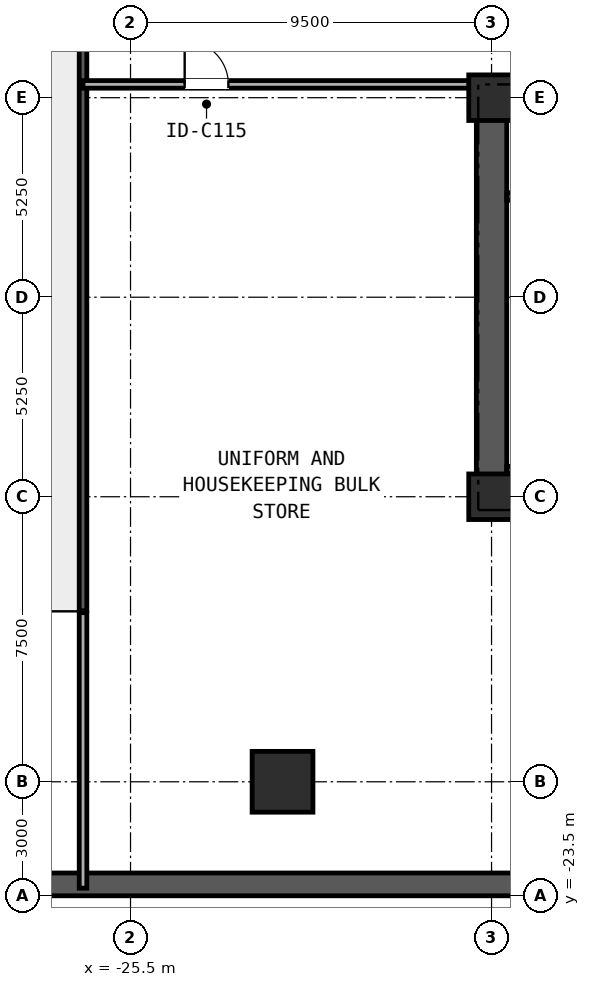
"""IFC4 building model, lengths in metres.
Left out: names, types, materials, properties, quantities, classifications, styles, units other than length and angle.
Written with IfcOpenShell. Run it as: python <this file> out.ifc"""

import sys

from ifc_helpers import new_model, si_unit, direction, frame, frame_2d, origin, origin_2d, place, context, subcontext, project, spatial, rectangle, extrude, element, fill, save


model = new_model("IFC4")
c1 = context("Model", 3, precision=1e-05, world=origin(), true_north=direction((0.0, 1.0)))
c2 = subcontext(c1, "Body", "Model", "MODEL_VIEW")
j1 = project(units=[si_unit("LENGTHUNIT", "METRE"), si_unit("PLANEANGLEUNIT", "RADIAN")], contexts=[c1])
p1 = place(None, origin())
s1 = spatial("IfcSite", under=j1, at=p1, CompositionType="ELEMENT")
p2 = place(p1, origin())
s2 = spatial("IfcBuilding", under=s1, at=p2, CompositionType="ELEMENT")
p3 = place(p2, frame((0.0, 0.0, -5.2)))
s3 = spatial("IfcBuildingStorey", under=s2, at=p3, CompositionType="ELEMENT", Elevation=-5.2)
p4 = place(p3, frame((-16.4, -13.0, 0.0), z_axis=(0.0, 0.0, 1.0), x_axis=(1.0, 0.0, 0.0)))
e1 = element("IfcWall", 1, at=p4, inside=s3, PredefinedType="SHEAR", context=c2, shape_type="SweptSolid", body=[
    extrude(rectangle(XDim=32.8, YDim=0.8, at=frame_2d((16.4, 0.0))), origin(), (0.0, 0.0, 1.0), 4.62),
])
p5 = place(p3, frame((-16.4, -2.5, 0.0), z_axis=(0.0, 0.0, 1.0), x_axis=(1.0, 0.0, 0.0)))
e2 = element("IfcWall", 2, at=p5, inside=s3, PredefinedType="SHEAR", context=c2, shape_type="SweptSolid", body=[
    extrude(rectangle(XDim=32.8, YDim=0.8, at=frame_2d((16.4, 0.0))), origin(), (0.0, 0.0, 1.0), 4.62),
])
p6 = place(p5, frame((6.025, 0.0, 0.0)))
e3 = element("IfcOpeningElement", 3, at=p6, cuts=e2, PredefinedType="OPENING", context=c2, shape_type="SweptSolid", body=[
    extrude(rectangle(XDim=1.15, YDim=2.0, at=frame_2d((0.575, 1.0))), frame((0.0, 0.41, 0.0), z_axis=(0.0, -1.0, 0.0), x_axis=(1.0, 0.0, 0.0)), (0.0, 0.0, 1.0), 0.82),
])
p7 = place(p5, frame((15.6, 0.0, 0.0)))
e4 = element("IfcOpeningElement", 4, at=p7, cuts=e2, PredefinedType="OPENING", context=c2, shape_type="SweptSolid", body=[
    extrude(rectangle(XDim=1.6, YDim=2.0, at=frame_2d((0.8, 1.0))), frame((0.0, 0.41, 0.0), z_axis=(0.0, -1.0, 0.0), x_axis=(1.0, 0.0, 0.0)), (0.0, 0.0, 1.0), 0.82),
])
p8 = place(p5, frame((25.625, 0.0, 0.0)))
e5 = element("IfcOpeningElement", 5, at=p8, cuts=e2, PredefinedType="OPENING", context=c2, shape_type="SweptSolid", body=[
    extrude(rectangle(XDim=1.15, YDim=2.0, at=frame_2d((0.575, 1.0))), frame((0.0, 0.41, 0.0), z_axis=(0.0, -1.0, 0.0), x_axis=(1.0, 0.0, 0.0)), (0.0, 0.0, 1.0), 0.82),
])
p9 = place(p3, frame((-16.0, -12.6, 0.0), z_axis=(0.0, 0.0, 1.0), x_axis=(0.0, 1.0, 0.0)))
e6 = element("IfcWall", 6, at=p9, inside=s3, PredefinedType="SHEAR", context=c2, shape_type="SweptSolid", body=[
    extrude(rectangle(XDim=9.7, YDim=0.8, at=frame_2d((4.85, 0.0))), origin(), (0.0, 0.0, 1.0), 4.62),
])
for number, where, z_axis, x_axis in (
    (7, (-15.6, -12.3, 0.0), (0.0, 0.0, 1.0), (1.0, 0.0, 0.0)),
    (8, (-15.6, -5.1, 0.0), (0.0, 0.0, 1.0), (1.0, 0.0, 0.0)),
):
    element("IfcWall", number, at=place(p3, frame(where, z_axis=z_axis, x_axis=x_axis)), inside=s3, PredefinedType="SOLIDWALL", context=c2, shape_type="SweptSolid", body=[
        extrude(rectangle(XDim=3.6, YDim=0.2, at=frame_2d((1.8, 0.0))), origin(), (0.0, 0.0, 1.0), 4.9),
    ])
p10 = place(p3, frame((-26.75, -16.0, 0.0), z_axis=(0.0, 0.0, 1.0), x_axis=(0.0, 1.0, 0.0)))
e9 = element("IfcWall", 9, at=p10, inside=s3, PredefinedType="SOLIDWALL", context=c2, shape_type="SweptSolid", body=[
    extrude(rectangle(XDim=31.42, YDim=0.2, at=frame_2d((15.71, 0.0))), origin(), (0.0, 0.0, 1.0), 4.9),
])
p11 = place(p3, frame((-34.0, -23.2, 0.0), z_axis=(0.0, 0.0, 1.0), x_axis=(1.0, 0.0, 0.0)))
e10 = element("IfcWall", 10, at=p11, inside=s3, PredefinedType="SOLIDWALL", context=c2, shape_type="SweptSolid", body=[
    extrude(rectangle(XDim=68.0, YDim=0.6, at=frame_2d((34.0, 0.0))), origin(), (0.0, 0.0, 1.0), 4.9),
])
for number, where, z_axis, x_axis in (
    (11, (-16.0, -13.0, 0.0), (0.0, 0.0, 1.0), (1.0, 0.0, 0.0)),
    (12, (-16.0, -2.5, 0.0), (0.0, 0.0, 1.0), (1.0, 0.0, 0.0)),
):
    element("IfcColumn", number, at=place(p3, frame(where, z_axis=z_axis, x_axis=x_axis)), inside=s3, PredefinedType="COLUMN", context=c2, shape_type="SweptSolid", body=[
        extrude(rectangle(XDim=1.2, YDim=1.2, at=origin_2d()), origin(), (0.0, 0.0, 1.0), 5.2),
    ])
p12 = place(p3, frame((-21.5, -20.5, 0.0), z_axis=(0.0, 0.0, 1.0), x_axis=(1.0, 0.0, 0.0)))
e13 = element("IfcColumn", 13, at=p12, inside=s3, PredefinedType="COLUMN", context=c2, shape_type="SweptSolid", body=[
    extrude(rectangle(XDim=1.6, YDim=1.6, at=origin_2d()), origin(), (0.0, 0.0, 1.0), 5.2),
])
p13 = place(p3, frame((-26.75, -2.15, 0.0), z_axis=(0.0, 0.0, 1.0), x_axis=(1.0, 0.0, 0.0)))
e14 = element("IfcWall", 14, at=p13, inside=s3, PredefinedType="PARTITIONING", context=c2, shape_type="SweptSolid", body=[
    extrude(rectangle(XDim=10.75, YDim=0.2, at=frame_2d((5.375, 0.0))), origin(), (0.0, 0.0, 1.0), 4.03),
])
p14 = place(p13, frame((2.675, 0.0, 0.0)))
e15 = element("IfcOpeningElement", 15, at=p14, cuts=e14, PredefinedType="OPENING", context=c2, shape_type="SweptSolid", body=[
    extrude(rectangle(XDim=1.15, YDim=2.2, at=frame_2d((0.575, 1.1))), frame((0.0, 0.11, 0.0), z_axis=(0.0, -1.0, 0.0), x_axis=(1.0, 0.0, 0.0)), (0.0, 0.0, 1.0), 0.22),
])
p15 = place(p3, frame((-26.75, -23.3, 0.0), z_axis=(0.0, 0.0, 1.0), x_axis=(0.0, 1.0, 0.0)))
e16 = element("IfcWall", 16, at=p15, inside=s3, PredefinedType="PARTITIONING", context=c2, shape_type="SweptSolid", body=[
    extrude(rectangle(XDim=7.25, YDim=0.2, at=frame_2d((3.625, 0.0))), origin(), (0.0, 0.0, 1.0), 4.112),
])
p16 = place(p14, origin())
e17 = element("IfcDoor", 17, at=p16, inside=s3, OperationType="SINGLE_SWING_LEFT", PredefinedType="DOOR", context=c2, shape_type="SweptSolid", body=[
    extrude(rectangle(XDim=1.15, YDim=2.2, at=frame_2d((0.575, 1.1))), frame((0.0, 0.025, 0.0), z_axis=(0.0, -1.0, 0.0), x_axis=(1.0, 0.0, 0.0)), (0.0, 0.0, 1.0), 0.05),
])
fill(e15, e17)
save(model, sys.argv[1])
